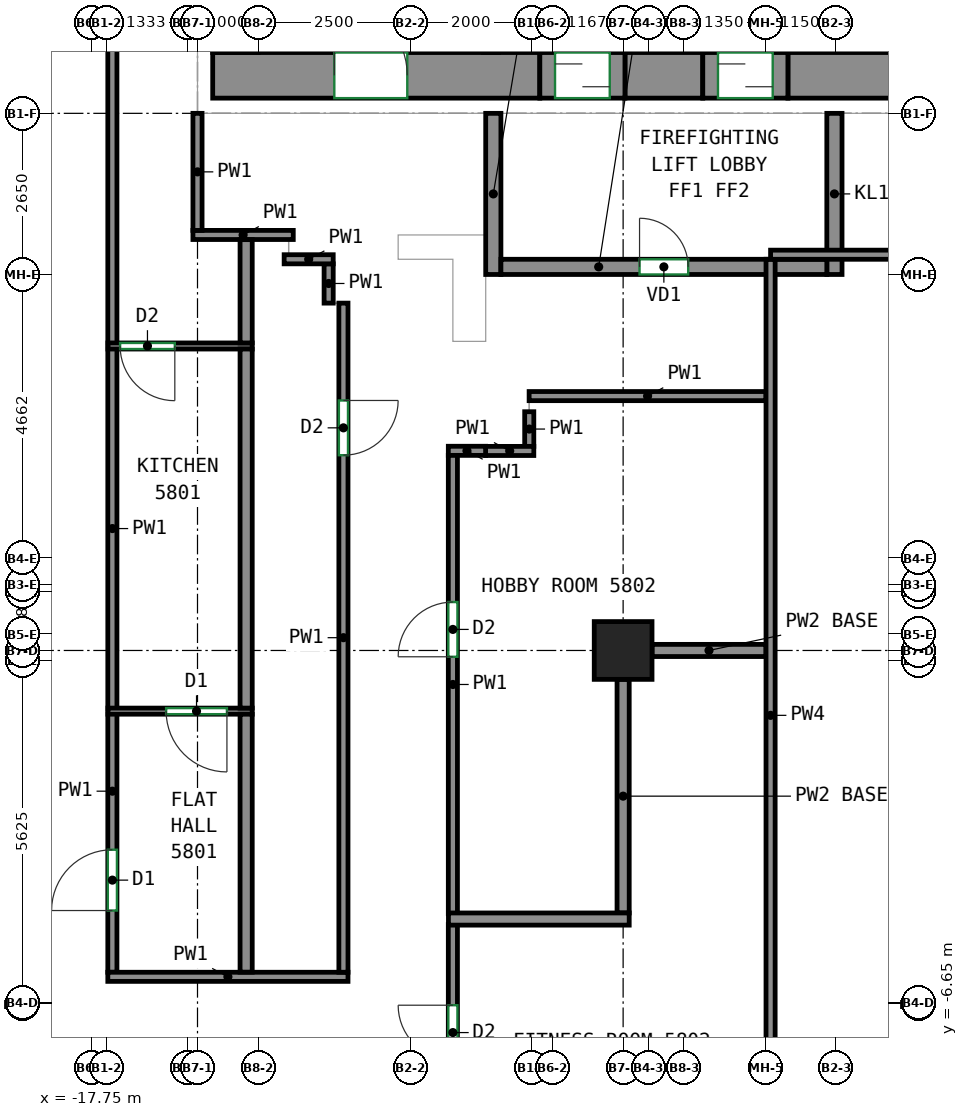
"""IFC4 building model, lengths in metres.
Left out: names, types, materials, properties, quantities, classifications, styles, units other than length and angle.
Written with IfcOpenShell. Run it as: python <this file> out.ifc"""

import sys

from ifc_helpers import new_model, si_unit, direction, frame, frame_2d, origin, origin_2d, place, context, subcontext, project, spatial, rectangle, extrude, source, transform, mapped, element, fill, save


model = new_model("IFC4")
c1 = context("Model", 3, precision=1e-05, world=origin(), true_north=direction((0.0, 1.0)))
c2 = subcontext(c1, "Body", "Model", "MODEL_VIEW")
j1 = project(units=[si_unit("LENGTHUNIT", "METRE"), si_unit("PLANEANGLEUNIT", "RADIAN")], contexts=[c1])
p1 = place(None, origin())
s1 = spatial("IfcSite", under=j1, at=p1, CompositionType="ELEMENT")
p2 = place(p1, origin())
s2 = spatial("IfcBuilding", under=s1, at=p2, CompositionType="ELEMENT")
p3 = place(p2, frame((0.0, 0.0, 242.4)))
s3 = spatial("IfcBuildingStorey", under=s2, at=p3, CompositionType="ELEMENT", Elevation=242.4)
m1 = source(origin(), c2, "Body", "SweptSolid", [
    extrude(rectangle(XDim=0.95, YDim=0.95, at=origin_2d()), origin(), (0.0, 0.0, 1.0), 3.12),
])
p4 = place(p3, frame((-9.0, -0.833, 0.0), z_axis=(0.0, 0.0, 1.0), x_axis=(1.0, 0.0, 0.0)))
e1 = element("IfcColumn", 1, at=p4, inside=s3, PredefinedType="COLUMN", context=c2, shape_type="MappedRepresentation", body=[
    mapped(m1, transform((0.0, 0.0, 0.0))),
])
m2 = source(origin(), c2, "Body", "SweptSolid", [
    extrude(rectangle(XDim=5.38, YDim=0.75, at=frame_2d((2.69, 0.0))), origin(), (0.0, 0.0, 1.0), 3.12),
])
p5 = place(p3, frame((-15.75, 8.625, 0.0), z_axis=(0.0, 0.0, 1.0), x_axis=(1.0, 0.0, 0.0)))
e2 = element("IfcWall", 2, at=p5, inside=s3, PredefinedType="SHEAR", context=c2, shape_type="MappedRepresentation", body=[
    mapped(m2, transform((0.0, 0.0, 0.0))),
])
p6 = place(p5, frame((2.0, 0.0, 0.0)))
e3 = element("IfcOpeningElement", 3, at=p6, cuts=e2, PredefinedType="OPENING", context=c2, shape_type="SweptSolid", body=[
    extrude(rectangle(XDim=1.2, YDim=2.1, at=frame_2d((0.6, 1.05))), frame((0.0, 0.385, 0.0), z_axis=(0.0, -1.0, 0.0), x_axis=(1.0, 0.0, 0.0)), (0.0, 0.0, 1.0), 0.77),
])
m3 = source(origin(), c2, "Body", "SweptSolid", [
    extrude(rectangle(XDim=1.28, YDim=0.75, at=frame_2d((0.64, 0.0))), origin(), (0.0, 0.0, 1.0), 3.12),
])
p7 = place(p3, frame((-8.97, 8.625, 0.0), z_axis=(0.0, 0.0, 1.0), x_axis=(1.0, 0.0, 0.0)))
e4 = element("IfcWall", 4, at=p7, inside=s3, PredefinedType="SHEAR", context=c2, shape_type="MappedRepresentation", body=[
    mapped(m3, transform((0.0, 0.0, 0.0))),
])
m4 = source(origin(), c2, "Body", "SweptSolid", [
    extrude(rectangle(XDim=14.18, YDim=0.75, at=frame_2d((7.09, 0.0))), origin(), (0.0, 0.0, 1.0), 3.12),
])
p8 = place(p3, frame((-6.29, 8.625, 0.0), z_axis=(0.0, 0.0, 1.0), x_axis=(1.0, 0.0, 0.0)))
e5 = element("IfcWall", 5, at=p8, inside=s3, PredefinedType="SHEAR", context=c2, shape_type="MappedRepresentation", body=[
    mapped(m4, transform((0.0, 0.0, 0.0))),
])
m5 = source(origin(), c2, "Body", "SweptSolid", [
    extrude(rectangle(XDim=2.65, YDim=0.25, at=frame_2d((1.325, 0.0))), origin(), (0.0, 0.0, 1.0), 2.57),
])
for number, where, z_axis, x_axis in (
    (6, (-11.135, 5.35, 0.0), (0.0, 0.0, 1.0), (0.0, 1.0, 0.0)),
    (7, (-5.525, 5.35, 0.0), (0.0, 0.0, 1.0), (0.0, 1.0, 0.0)),
):
    element("IfcWall", number, at=place(p3, frame(where, z_axis=z_axis, x_axis=x_axis)), inside=s3, PredefinedType="PARTITIONING", context=c2, shape_type="MappedRepresentation", body=[
        mapped(m5, transform((0.0, 0.0, 0.0))),
    ])
m6 = source(origin(), c2, "Body", "SweptSolid", [
    extrude(rectangle(XDim=5.36, YDim=0.25, at=frame_2d((2.68, 0.0))), origin(), (0.0, 0.0, 1.0), 3.12),
])
p9 = place(p3, frame((-11.01, 5.475, 0.0), z_axis=(0.0, 0.0, 1.0), x_axis=(1.0, 0.0, 0.0)))
e8 = element("IfcWall", 8, at=p9, inside=s3, PredefinedType="PARTITIONING", context=c2, shape_type="MappedRepresentation", body=[
    mapped(m6, transform((0.0, 0.0, 0.0))),
])
p10 = place(p9, frame((2.28, 0.0, 0.0)))
e9 = element("IfcOpeningElement", 9, at=p10, cuts=e8, PredefinedType="OPENING", context=c2, shape_type="SweptSolid", body=[
    extrude(rectangle(XDim=0.8, YDim=2.0, at=frame_2d((0.4, 1.0))), frame((0.0, 0.135, 0.0), z_axis=(0.0, -1.0, 0.0), x_axis=(1.0, 0.0, 0.0)), (0.0, 0.0, 1.0), 0.27),
])
m7 = source(origin(), c2, "Body", "SweptSolid", [
    extrude(rectangle(XDim=1.4, YDim=0.75, at=frame_2d((0.7, 0.0))), origin(), (0.0, 0.0, 1.0), 2.7),
])
p11 = place(p3, frame((-10.37, 8.625, 0.0), z_axis=(0.0, 0.0, 1.0), x_axis=(1.0, 0.0, 0.0)))
e10 = element("IfcWall", 10, at=p11, inside=s3, PredefinedType="PARTITIONING", context=c2, shape_type="MappedRepresentation", body=[
    mapped(m7, transform((0.0, 0.0, 0.0))),
])
p12 = place(p11, frame((0.25, 0.0, 0.0)))
e11 = element("IfcOpeningElement", 11, at=p12, cuts=e10, PredefinedType="OPENING", context=c2, shape_type="SweptSolid", body=[
    extrude(rectangle(XDim=0.9, YDim=2.1, at=frame_2d((0.45, 1.05))), frame((0.0, 0.385, 0.0), z_axis=(0.0, -1.0, 0.0), x_axis=(1.0, 0.0, 0.0)), (0.0, 0.0, 1.0), 0.77),
])
m8 = source(origin(), c2, "Body", "SweptSolid", [
    extrude(rectangle(XDim=1.4, YDim=0.75, at=frame_2d((0.7, 0.0))), origin(), (0.0, 0.0, 1.0), 2.7),
])
p13 = place(p3, frame((-7.69, 8.625, 0.0), z_axis=(0.0, 0.0, 1.0), x_axis=(1.0, 0.0, 0.0)))
e12 = element("IfcWall", 12, at=p13, inside=s3, PredefinedType="PARTITIONING", context=c2, shape_type="MappedRepresentation", body=[
    mapped(m8, transform((0.0, 0.0, 0.0))),
])
p14 = place(p13, frame((0.25, 0.0, 0.0)))
e13 = element("IfcOpeningElement", 13, at=p14, cuts=e12, PredefinedType="OPENING", context=c2, shape_type="SweptSolid", body=[
    extrude(rectangle(XDim=0.9, YDim=2.1, at=frame_2d((0.45, 1.05))), frame((0.0, 0.385, 0.0), z_axis=(0.0, -1.0, 0.0), x_axis=(1.0, 0.0, 0.0)), (0.0, 0.0, 1.0), 0.77),
])
p15 = place(p3, frame((-17.4, -6.125, 0.0), z_axis=(0.0, 0.0, 1.0), x_axis=(0.0, 1.0, 0.0)))
e14 = element("IfcWall", 14, at=p15, inside=s3, PredefinedType="PARTITIONING", context=c2, shape_type="SweptSolid", body=[
    extrude(rectangle(XDim=4.254, YDim=0.15, at=frame_2d((2.127, 0.0))), origin(), (0.0, 0.0, 1.0), 3.12),
])
p16 = place(p15, frame((1.015, 0.0, 0.0)))
e15 = element("IfcOpeningElement", 15, at=p16, cuts=e14, PredefinedType="OPENING", context=c2, shape_type="SweptSolid", body=[
    extrude(rectangle(XDim=1.0, YDim=2.1, at=frame_2d((0.5, 1.05))), frame((0.0, 0.085, 0.0), z_axis=(0.0, -1.0, 0.0), x_axis=(1.0, 0.0, 0.0)), (0.0, 0.0, 1.0), 0.17),
])
p17 = place(p3, frame((-17.475, -6.2, 0.0), z_axis=(0.0, 0.0, 1.0), x_axis=(1.0, 0.0, 0.0)))
e16 = element("IfcWall", 16, at=p17, inside=s3, PredefinedType="PARTITIONING", context=c2, shape_type="SweptSolid", body=[
    extrude(rectangle(XDim=3.95, YDim=0.15, at=frame_2d((1.975, 0.0))), origin(), (0.0, 0.0, 1.0), 3.12),
])
p18 = place(p3, frame((-17.4, -1.791, 0.0), z_axis=(0.0, 0.0, 1.0), x_axis=(0.0, 1.0, 0.0)))
e17 = element("IfcWall", 17, at=p18, inside=s3, PredefinedType="PARTITIONING", context=c2, shape_type="SweptSolid", body=[
    extrude(rectangle(XDim=5.925, YDim=0.15, at=frame_2d((2.962, 0.0))), origin(), (0.0, 0.0, 1.0), 3.12),
])
p19 = place(p3, frame((-17.4, 4.214, 0.0), z_axis=(0.0, 0.0, 1.0), x_axis=(0.0, 1.0, 0.0)))
e18 = element("IfcWall", 18, at=p19, inside=s3, PredefinedType="PARTITIONING", context=c2, shape_type="SweptSolid", body=[
    extrude(rectangle(XDim=12.477, YDim=0.15, at=frame_2d((6.238, 0.0))), origin(), (0.0, 0.0, 1.0), 3.12),
])
p20 = place(p3, frame((-16.075, 6.0, 0.0), z_axis=(0.0, 0.0, 1.0), x_axis=(1.0, 0.0, 0.0)))
e19 = element("IfcWall", 19, at=p20, inside=s3, PredefinedType="PARTITIONING", context=c2, shape_type="SweptSolid", body=[
    extrude(rectangle(XDim=1.65, YDim=0.15, at=frame_2d((0.825, 0.0))), origin(), (0.0, 0.0, 1.0), 3.12),
])
p21 = place(p3, frame((-16.0, 6.075, 0.0), z_axis=(0.0, 0.0, 1.0), x_axis=(0.0, 1.0, 0.0)))
e20 = element("IfcWall", 20, at=p21, inside=s3, PredefinedType="PARTITIONING", context=c2, shape_type="SweptSolid", body=[
    extrude(rectangle(XDim=1.925, YDim=0.15, at=frame_2d((0.962, 0.0))), origin(), (0.0, 0.0, 1.0), 3.12),
])
p22 = place(p3, frame((-13.6, 4.879, 0.0), z_axis=(0.0, 0.0, 1.0), x_axis=(0.0, -1.0, 0.0)))
e21 = element("IfcWall", 21, at=p22, inside=s3, PredefinedType="PARTITIONING", context=c2, shape_type="SweptSolid", body=[
    extrude(rectangle(XDim=11.004, YDim=0.15, at=frame_2d((5.502, 0.0))), origin(), (0.0, 0.0, 1.0), 3.12),
])
p23 = place(p22, frame((1.601, 0.0, 0.0)))
e22 = element("IfcOpeningElement", 22, at=p23, cuts=e21, PredefinedType="OPENING", context=c2, shape_type="SweptSolid", body=[
    extrude(rectangle(XDim=0.9, YDim=2.1, at=frame_2d((0.45, 1.05))), frame((0.0, 0.085, 0.0), z_axis=(0.0, -1.0, 0.0), x_axis=(1.0, 0.0, 0.0)), (0.0, 0.0, 1.0), 0.17),
])
p24 = place(p3, frame((-13.843, 5.525, 0.0), z_axis=(0.0, 0.0, 1.0), x_axis=(0.0, -1.0, 0.0)))
e23 = element("IfcWall", 23, at=p24, inside=s3, PredefinedType="PARTITIONING", context=c2, shape_type="SweptSolid", body=[
    extrude(rectangle(XDim=0.646, YDim=0.15, at=frame_2d((0.323, 0.0))), origin(), (0.0, 0.0, 1.0), 3.12),
])
p25 = place(p3, frame((-14.575, 5.6, 0.0), z_axis=(0.0, 0.0, 1.0), x_axis=(1.0, 0.0, 0.0)))
e24 = element("IfcWall", 24, at=p25, inside=s3, PredefinedType="PARTITIONING", context=c2, shape_type="SweptSolid", body=[
    extrude(rectangle(XDim=0.807, YDim=0.15, at=frame_2d((0.403, 0.0))), origin(), (0.0, 0.0, 1.0), 3.12),
])
p26 = place(p3, frame((-10.546, 3.35, 0.0), z_axis=(0.0, 0.0, 1.0), x_axis=(1.0, 0.0, 0.0)))
e25 = element("IfcWall", 25, at=p26, inside=s3, PredefinedType="PARTITIONING", context=c2, shape_type="SweptSolid", body=[
    extrude(rectangle(XDim=3.896, YDim=0.15, at=frame_2d((1.948, 0.0))), origin(), (0.0, 0.0, 1.0), 3.12),
])
p27 = place(p3, frame((-10.544, 2.523, 0.0), z_axis=(0.0, 0.0, 1.0), x_axis=(0.0, 1.0, 0.0)))
e26 = element("IfcWall", 26, at=p27, inside=s3, PredefinedType="PARTITIONING", context=c2, shape_type="SweptSolid", body=[
    extrude(rectangle(XDim=0.57, YDim=0.15, at=frame_2d((0.285, 0.0))), origin(), (0.0, 0.0, 1.0), 3.12),
])
p28 = place(p3, frame((-11.262, 2.448, 0.0), z_axis=(0.0, 0.0, 1.0), x_axis=(1.0, 0.0, 0.0)))
e27 = element("IfcWall", 27, at=p28, inside=s3, PredefinedType="PARTITIONING", context=c2, shape_type="SweptSolid", body=[
    extrude(rectangle(XDim=0.793, YDim=0.15, at=frame_2d((0.396, 0.0))), origin(), (0.0, 0.0, 1.0), 3.12),
])
p29 = place(p3, frame((-11.875, 2.45, 0.0), z_axis=(0.0, 0.0, 1.0), x_axis=(1.0, 0.0, 0.0)))
e28 = element("IfcWall", 28, at=p29, inside=s3, PredefinedType="PARTITIONING", context=c2, shape_type="SweptSolid", body=[
    extrude(rectangle(XDim=0.613, YDim=0.15, at=frame_2d((0.307, 0.0))), origin(), (0.0, 0.0, 1.0), 3.12),
])
p30 = place(p3, frame((-11.8, -5.16, 0.0), z_axis=(0.0, 0.0, 1.0), x_axis=(0.0, 1.0, 0.0)))
e29 = element("IfcWall", 29, at=p30, inside=s3, PredefinedType="PARTITIONING", context=c2, shape_type="SweptSolid", body=[
    extrude(rectangle(XDim=7.535, YDim=0.15, at=frame_2d((3.768, 0.0))), origin(), (0.0, 0.0, 1.0), 3.12),
])
p31 = place(p30, frame((4.223, 0.0, 0.0)))
e30 = element("IfcOpeningElement", 30, at=p31, cuts=e29, PredefinedType="OPENING", context=c2, shape_type="SweptSolid", body=[
    extrude(rectangle(XDim=0.9, YDim=2.1, at=frame_2d((0.45, 1.05))), frame((0.0, 0.085, 0.0), z_axis=(0.0, -1.0, 0.0), x_axis=(1.0, 0.0, 0.0)), (0.0, 0.0, 1.0), 0.17),
])
p32 = place(p3, frame((-11.8, -10.125, 0.0), z_axis=(0.0, 0.0, 1.0), x_axis=(0.0, 1.0, 0.0)))
e31 = element("IfcWall", 31, at=p32, inside=s3, PredefinedType="PARTITIONING", context=c2, shape_type="SweptSolid", body=[
    extrude(rectangle(XDim=4.785, YDim=0.15, at=frame_2d((2.393, 0.0))), origin(), (0.0, 0.0, 1.0), 3.12),
])
p33 = place(p32, frame((2.558, 0.0, 0.0)))
e32 = element("IfcOpeningElement", 32, at=p33, cuts=e31, PredefinedType="OPENING", context=c2, shape_type="SweptSolid", body=[
    extrude(rectangle(XDim=0.9, YDim=2.1, at=frame_2d((0.45, 1.05))), frame((0.0, 0.085, 0.0), z_axis=(0.0, -1.0, 0.0), x_axis=(1.0, 0.0, 0.0)), (0.0, 0.0, 1.0), 0.17),
])
p34 = place(p3, frame((-15.1, -1.831, 0.0), z_axis=(0.0, 0.0, 1.0), x_axis=(-1.0, 0.0, 0.0)))
e33 = element("IfcWall", 33, at=p34, inside=s3, PredefinedType="PARTITIONING", context=c2, shape_type="SweptSolid", body=[
    extrude(rectangle(XDim=2.373, YDim=0.1, at=frame_2d((1.187, 0.0))), origin(), (0.0, 0.0, 1.0), 3.12),
])
p35 = place(p34, frame((0.416, 0.0, 0.0)))
e34 = element("IfcOpeningElement", 34, at=p35, cuts=e33, PredefinedType="OPENING", context=c2, shape_type="SweptSolid", body=[
    extrude(rectangle(XDim=1.0, YDim=2.1, at=frame_2d((0.5, 1.05))), frame((0.0, 0.06, 0.0), z_axis=(0.0, -1.0, 0.0), x_axis=(1.0, 0.0, 0.0)), (0.0, 0.0, 1.0), 0.12),
])
p36 = place(p3, frame((-15.2, -6.123, 0.0), z_axis=(0.0, 0.0, 1.0), x_axis=(0.0, 1.0, 0.0)))
e35 = element("IfcWall", 35, at=p36, inside=s3, PredefinedType="PARTITIONING", context=c2, shape_type="SweptSolid", body=[
    extrude(rectangle(XDim=4.242, YDim=0.2, at=frame_2d((2.121, 0.0))), origin(), (0.0, 0.0, 1.0), 3.12),
])
p37 = place(p3, frame((-15.1, 4.174, 0.0), z_axis=(0.0, 0.0, 1.0), x_axis=(-1.0, 0.0, 0.0)))
e36 = element("IfcWall", 36, at=p37, inside=s3, PredefinedType="PARTITIONING", context=c2, shape_type="SweptSolid", body=[
    extrude(rectangle(XDim=2.373, YDim=0.1, at=frame_2d((1.187, 0.0))), origin(), (0.0, 0.0, 1.0), 3.12),
])
p38 = place(p37, frame((1.273, 0.0, 0.0)))
e37 = element("IfcOpeningElement", 37, at=p38, cuts=e36, PredefinedType="OPENING", context=c2, shape_type="SweptSolid", body=[
    extrude(rectangle(XDim=0.9, YDim=2.1, at=frame_2d((0.45, 1.05))), frame((0.0, 0.06, 0.0), z_axis=(0.0, -1.0, 0.0), x_axis=(1.0, 0.0, 0.0)), (0.0, 0.0, 1.0), 0.12),
])
p39 = place(p3, frame((-15.2, -1.781, 0.0), z_axis=(0.0, 0.0, 1.0), x_axis=(0.0, 1.0, 0.0)))
e38 = element("IfcWall", 38, at=p39, inside=s3, PredefinedType="PARTITIONING", context=c2, shape_type="SweptSolid", body=[
    extrude(rectangle(XDim=5.905, YDim=0.2, at=frame_2d((2.953, 0.0))), origin(), (0.0, 0.0, 1.0), 3.12),
])
p40 = place(p3, frame((-15.2, 4.224, 0.0), z_axis=(0.0, 0.0, 1.0), x_axis=(0.0, 1.0, 0.0)))
e39 = element("IfcWall", 39, at=p40, inside=s3, PredefinedType="PARTITIONING", context=c2, shape_type="SweptSolid", body=[
    extrude(rectangle(XDim=1.699, YDim=0.2, at=frame_2d((0.85, 0.0))), origin(), (0.0, 0.0, 1.0), 3.12),
])
p41 = place(p3, frame((-8.525, -0.833, 0.0), z_axis=(0.0, 0.0, 1.0), x_axis=(1.0, 0.0, 0.0)))
e40 = element("IfcWall", 40, at=p41, inside=s3, PredefinedType="PARTITIONING", context=c2, shape_type="SweptSolid", body=[
    extrude(rectangle(XDim=1.875, YDim=0.2, at=frame_2d((0.938, 0.0))), origin(), (0.0, 0.0, 1.0), 2.57),
])
p42 = place(p3, frame((-9.0, -5.15, 0.0), z_axis=(0.0, 0.0, 1.0), x_axis=(0.0, 1.0, 0.0)))
e41 = element("IfcWall", 41, at=p42, inside=s3, PredefinedType="PARTITIONING", context=c2, shape_type="SweptSolid", body=[
    extrude(rectangle(XDim=3.842, YDim=0.2, at=frame_2d((1.921, 0.0))), origin(), (0.0, 0.0, 1.0), 2.57),
])
p43 = place(p3, frame((-11.873, -5.25, 0.0), z_axis=(0.0, 0.0, 1.0), x_axis=(1.0, 0.0, 0.0)))
e42 = element("IfcWall", 42, at=p43, inside=s3, PredefinedType="PARTITIONING", context=c2, shape_type="SweptSolid", body=[
    extrude(rectangle(XDim=2.973, YDim=0.2, at=frame_2d((1.487, 0.0))), origin(), (0.0, 0.0, 1.0), 3.12),
])
p44 = place(p3, frame((-6.575, -9.4, 0.0), z_axis=(0.0, 0.0, 1.0), x_axis=(0.0, 1.0, 0.0)))
e43 = element("IfcWall", 43, at=p44, inside=s3, PredefinedType="PARTITIONING", context=c2, shape_type="SweptSolid", body=[
    extrude(rectangle(XDim=15.0, YDim=0.15, at=frame_2d((7.5, 0.0))), origin(), (0.0, 0.0, 1.0), 3.12),
])
p45 = place(p3, frame((-6.575, 5.675, 0.0), z_axis=(0.0, 0.0, 1.0), x_axis=(1.0, 0.0, 0.0)))
e44 = element("IfcWall", 44, at=p45, inside=s3, PredefinedType="PARTITIONING", context=c2, shape_type="SweptSolid", body=[
    extrude(rectangle(XDim=15.075, YDim=0.15, at=frame_2d((7.538, 0.0))), origin(), (0.0, 0.0, 1.0), 3.12),
])
p46 = place(p10, origin())
e45 = element("IfcDoor", 45, at=p46, inside=s3, OperationType="SINGLE_SWING_LEFT", PredefinedType="DOOR", context=c2, shape_type="SweptSolid", body=[
    extrude(rectangle(XDim=0.8, YDim=2.0, at=frame_2d((0.4, 1.0))), frame((0.0, 0.025, 0.0), z_axis=(0.0, -1.0, 0.0), x_axis=(1.0, 0.0, 0.0)), (0.0, 0.0, 1.0), 0.05),
])
fill(e9, e45)
p47 = place(p12, origin())
e46 = element("IfcDoor", 46, at=p47, inside=s3, OperationType="SLIDING_TO_LEFT", PredefinedType="DOOR", context=c2, shape_type="SweptSolid", body=[
    extrude(rectangle(XDim=0.9, YDim=2.1, at=frame_2d((0.45, 1.05))), frame((0.0, 0.28, 0.0), z_axis=(0.0, -1.0, 0.0), x_axis=(1.0, 0.0, 0.0)), (0.0, 0.0, 1.0), 0.05),
])
fill(e11, e46)
p48 = place(p14, origin())
e47 = element("IfcDoor", 47, at=p48, inside=s3, OperationType="SLIDING_TO_RIGHT", PredefinedType="DOOR", context=c2, shape_type="SweptSolid", body=[
    extrude(rectangle(XDim=0.9, YDim=2.1, at=frame_2d((0.45, 1.05))), frame((0.0, 0.28, 0.0), z_axis=(0.0, -1.0, 0.0), x_axis=(1.0, 0.0, 0.0)), (0.0, 0.0, 1.0), 0.05),
])
fill(e13, e47)
p49 = place(p6, origin())
e48 = element("IfcDoor", 48, at=p49, inside=s3, OperationType="DOUBLE_DOOR_SINGLE_SWING", PredefinedType="DOOR", context=c2, shape_type="SweptSolid", body=[
    extrude(rectangle(XDim=1.2, YDim=2.1, at=frame_2d((0.6, 1.05))), frame((0.0, 0.28, 0.0), z_axis=(0.0, -1.0, 0.0), x_axis=(1.0, 0.0, 0.0)), (0.0, 0.0, 1.0), 0.05),
])
fill(e3, e48)
p50 = place(p33, origin())
e49 = element("IfcDoor", 49, at=p50, inside=s3, OperationType="SINGLE_SWING_RIGHT", PredefinedType="DOOR", context=c2, shape_type="SweptSolid", body=[
    extrude(rectangle(XDim=0.9, YDim=2.1, at=frame_2d((0.45, 1.05))), frame((0.0, 0.025, 0.0), z_axis=(0.0, -1.0, 0.0), x_axis=(1.0, 0.0, 0.0)), (0.0, 0.0, 1.0), 0.05),
])
fill(e32, e49)
p51 = place(p16, origin())
e50 = element("IfcDoor", 50, at=p51, inside=s3, OperationType="SINGLE_SWING_LEFT", PredefinedType="DOOR", context=c2, shape_type="SweptSolid", body=[
    extrude(rectangle(XDim=1.0, YDim=2.1, at=frame_2d((0.5, 1.05))), frame((0.0, 0.025, 0.0), z_axis=(0.0, -1.0, 0.0), x_axis=(1.0, 0.0, 0.0)), (0.0, 0.0, 1.0), 0.05),
])
fill(e15, e50)
p52 = place(p35, origin())
e51 = element("IfcDoor", 51, at=p52, inside=s3, OperationType="SINGLE_SWING_LEFT", PredefinedType="DOOR", context=c2, shape_type="SweptSolid", body=[
    extrude(rectangle(XDim=1.0, YDim=2.1, at=frame_2d((0.5, 1.05))), frame((0.0, 0.025, 0.0), z_axis=(0.0, -1.0, 0.0), x_axis=(1.0, 0.0, 0.0)), (0.0, 0.0, 1.0), 0.05),
])
fill(e34, e51)
p53 = place(p31, origin())
e52 = element("IfcDoor", 52, at=p53, inside=s3, OperationType="SINGLE_SWING_LEFT", PredefinedType="DOOR", context=c2, shape_type="SweptSolid", body=[
    extrude(rectangle(XDim=0.9, YDim=2.1, at=frame_2d((0.45, 1.05))), frame((0.0, 0.025, 0.0), z_axis=(0.0, -1.0, 0.0), x_axis=(1.0, 0.0, 0.0)), (0.0, 0.0, 1.0), 0.05),
])
fill(e30, e52)
p54 = place(p23, origin())
e53 = element("IfcDoor", 53, at=p54, inside=s3, OperationType="SINGLE_SWING_LEFT", PredefinedType="DOOR", context=c2, shape_type="SweptSolid", body=[
    extrude(rectangle(XDim=0.9, YDim=2.1, at=frame_2d((0.45, 1.05))), frame((0.0, 0.025, 0.0), z_axis=(0.0, -1.0, 0.0), x_axis=(1.0, 0.0, 0.0)), (0.0, 0.0, 1.0), 0.05),
])
fill(e22, e53)
p55 = place(p38, origin())
e54 = element("IfcDoor", 54, at=p55, inside=s3, OperationType="SINGLE_SWING_LEFT", PredefinedType="DOOR", context=c2, shape_type="SweptSolid", body=[
    extrude(rectangle(XDim=0.9, YDim=2.1, at=frame_2d((0.45, 1.05))), frame((0.0, 0.025, 0.0), z_axis=(0.0, -1.0, 0.0), x_axis=(1.0, 0.0, 0.0)), (0.0, 0.0, 1.0), 0.05),
])
fill(e37, e54)
save(model, sys.argv[1])
